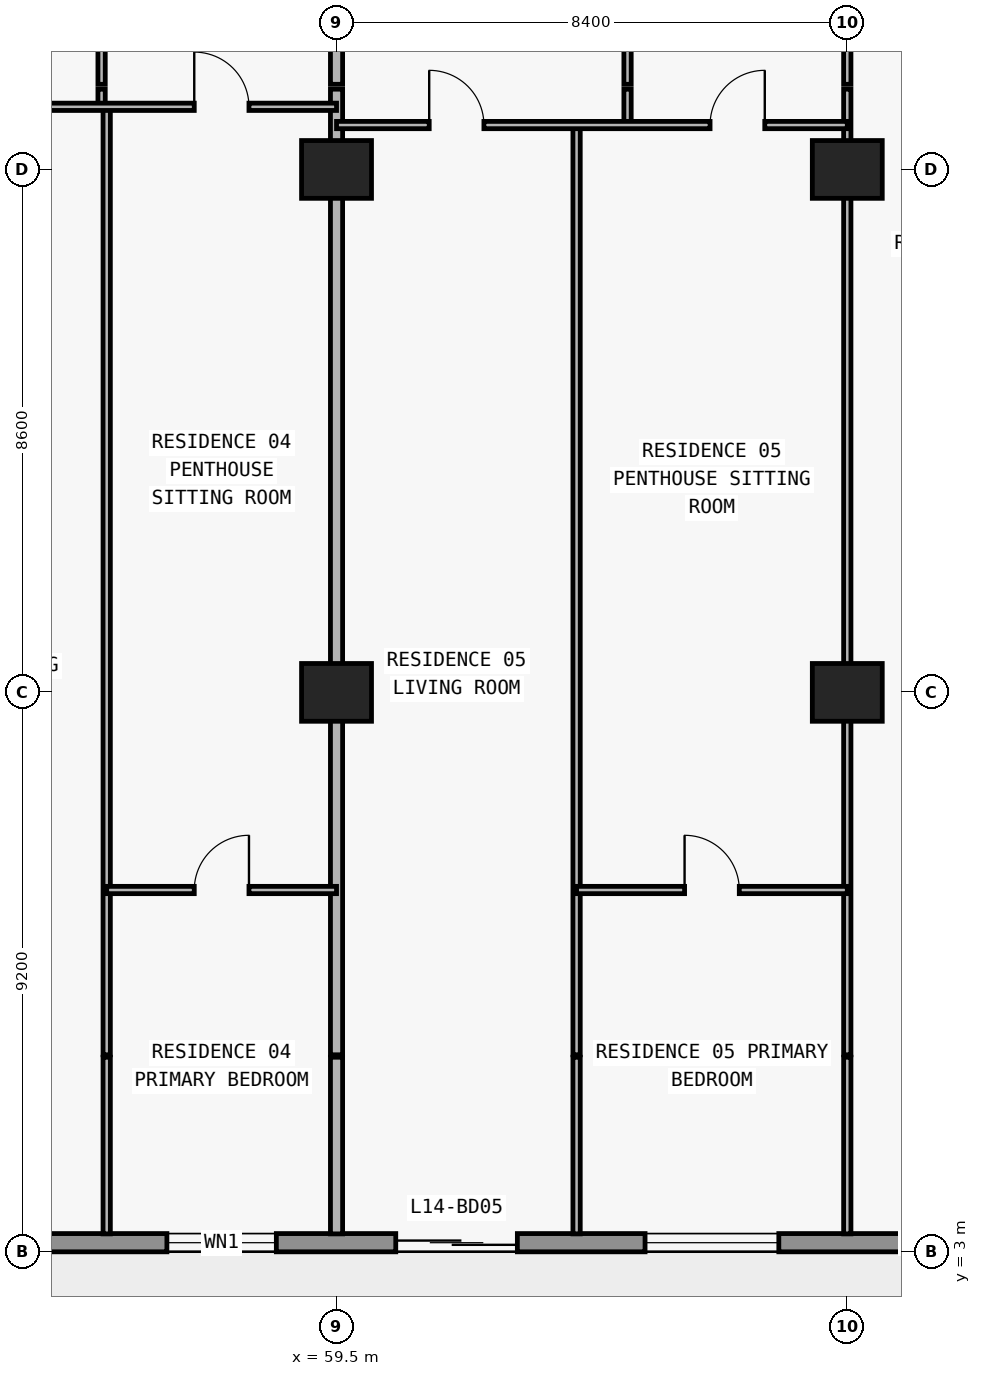
"""IFC4 building model, lengths in metres.
Left out: names, types, materials, properties, quantities, classifications, styles, units other than length and angle.
Written with IfcOpenShell. Run it as: python <this file> out.ifc"""

import sys

from ifc_helpers import new_model, si_unit, direction, frame, frame_2d, origin, origin_2d, place, context, subcontext, project, spatial, rectangle, extrude, element, fill, save


model = new_model("IFC4")
c1 = context("Model", 3, precision=1e-05, world=origin(), true_north=direction((0.0, 1.0)))
c2 = subcontext(c1, "Body", "Model", "MODEL_VIEW")
j1 = project(units=[si_unit("LENGTHUNIT", "METRE"), si_unit("PLANEANGLEUNIT", "RADIAN")], contexts=[c1])
p1 = place(None, origin())
s1 = spatial("IfcSite", under=j1, at=p1, CompositionType="ELEMENT")
p2 = place(p1, origin())
s2 = spatial("IfcBuilding", under=s1, at=p2, CompositionType="ELEMENT")
p3 = place(p2, frame((0.0, 0.0, 56.4)))
s3 = spatial("IfcBuildingStorey", under=s2, at=p3, CompositionType="ELEMENT", Elevation=56.4)
for number, where, z_axis, x_axis in (
    (1, (59.5, 12.2, 0.0), (0.0, 0.0, 1.0), (1.0, 0.0, 0.0)),
    (2, (67.9, 12.2, 0.0), (0.0, 0.0, 1.0), (1.0, 0.0, 0.0)),
    (3, (59.5, 20.8, 0.0), (0.0, 0.0, 1.0), (1.0, 0.0, 0.0)),
    (4, (67.9, 20.8, 0.0), (0.0, 0.0, 1.0), (1.0, 0.0, 0.0)),
):
    element("IfcColumn", number, at=place(p3, frame(where, z_axis=z_axis, x_axis=x_axis)), inside=s3, PredefinedType="COLUMN", context=c2, shape_type="SweptSolid", body=[
        extrude(rectangle(XDim=1.15, YDim=0.95, at=origin_2d()), origin(), (0.0, 0.0, 1.0), 3.05),
    ])
p4 = place(p3, frame((72.7, 3.15, 0.0), z_axis=(0.0, 0.0, 1.0), x_axis=(-1.0, 0.0, 0.0)))
e5 = element("IfcWall", 5, at=p4, inside=s3, PredefinedType="STANDARD", context=c2, shape_type="SweptSolid", body=[
    extrude(rectangle(XDim=67.6, YDim=0.3, at=frame_2d((33.8, 0.0))), origin(), (0.0, 0.0, 1.0), 3.05),
])
p5 = place(p4, frame((59.89, 0.0, 0.0)))
e6 = element("IfcOpeningElement", 6, at=p5, cuts=e5, PredefinedType="OPENING", context=c2, shape_type="SweptSolid", body=[
    extrude(rectangle(XDim=2.0, YDim=2.3, at=frame_2d((1.0, 1.15))), frame((0.0, 0.16, 0.0), z_axis=(0.0, -1.0, 0.0), x_axis=(1.0, 0.0, 0.0)), (0.0, 0.0, 1.0), 0.32),
])
p6 = place(p4, frame((55.21, 0.0, 0.65)))
e7 = element("IfcOpeningElement", 7, at=p6, cuts=e5, PredefinedType="OPENING", context=c2, shape_type="SweptSolid", body=[
    extrude(rectangle(XDim=2.6, YDim=1.85, at=frame_2d((1.3, 0.925))), frame((0.0, 0.16, 0.0), z_axis=(0.0, -1.0, 0.0), x_axis=(1.0, 0.0, 0.0)), (0.0, 0.0, 1.0), 0.32),
])
p7 = place(p4, frame((49.1, 0.0, 0.85)))
e8 = element("IfcOpeningElement", 8, at=p7, cuts=e5, PredefinedType="OPENING", context=c2, shape_type="SweptSolid", body=[
    extrude(rectangle(XDim=2.2, YDim=1.55, at=frame_2d((1.1, 0.775))), frame((0.0, 0.16, 0.0), z_axis=(0.0, -1.0, 0.0), x_axis=(1.0, 0.0, 0.0)), (0.0, 0.0, 1.0), 0.32),
])
p8 = place(p4, frame((43.09, 0.0, 0.0)))
e9 = element("IfcOpeningElement", 9, at=p8, cuts=e5, PredefinedType="OPENING", context=c2, shape_type="SweptSolid", body=[
    extrude(rectangle(XDim=2.0, YDim=2.3, at=frame_2d((1.0, 1.15))), frame((0.0, 0.16, 0.0), z_axis=(0.0, -1.0, 0.0), x_axis=(1.0, 0.0, 0.0)), (0.0, 0.0, 1.0), 0.32),
])
p9 = place(p4, frame((38.41, 0.0, 0.65)))
e10 = element("IfcOpeningElement", 10, at=p9, cuts=e5, PredefinedType="OPENING", context=c2, shape_type="SweptSolid", body=[
    extrude(rectangle(XDim=2.6, YDim=1.85, at=frame_2d((1.3, 0.925))), frame((0.0, 0.16, 0.0), z_axis=(0.0, -1.0, 0.0), x_axis=(1.0, 0.0, 0.0)), (0.0, 0.0, 1.0), 0.32),
])
p10 = place(p4, frame((32.7, 0.0, 0.85)))
e11 = element("IfcOpeningElement", 11, at=p10, cuts=e5, PredefinedType="OPENING", context=c2, shape_type="SweptSolid", body=[
    extrude(rectangle(XDim=2.2, YDim=1.55, at=frame_2d((1.1, 0.775))), frame((0.0, 0.16, 0.0), z_axis=(0.0, -1.0, 0.0), x_axis=(1.0, 0.0, 0.0)), (0.0, 0.0, 1.0), 0.32),
])
p11 = place(p4, frame((27.026, 0.0, 0.0)))
e12 = element("IfcOpeningElement", 12, at=p11, cuts=e5, PredefinedType="OPENING", context=c2, shape_type="SweptSolid", body=[
    extrude(rectangle(XDim=2.0, YDim=2.3, at=frame_2d((1.0, 1.15))), frame((0.0, 0.16, 0.0), z_axis=(0.0, -1.0, 0.0), x_axis=(1.0, 0.0, 0.0)), (0.0, 0.0, 1.0), 0.32),
])
p12 = place(p4, frame((22.726, 0.0, 0.85)))
e13 = element("IfcOpeningElement", 13, at=p12, cuts=e5, PredefinedType="OPENING", context=c2, shape_type="SweptSolid", body=[
    extrude(rectangle(XDim=2.2, YDim=1.55, at=frame_2d((1.1, 0.775))), frame((0.0, 0.16, 0.0), z_axis=(0.0, -1.0, 0.0), x_axis=(1.0, 0.0, 0.0)), (0.0, 0.0, 1.0), 0.32),
])
p13 = place(p4, frame((18.29, 0.0, 0.0)))
e14 = element("IfcOpeningElement", 14, at=p13, cuts=e5, PredefinedType="OPENING", context=c2, shape_type="SweptSolid", body=[
    extrude(rectangle(XDim=2.0, YDim=2.3, at=frame_2d((1.0, 1.15))), frame((0.0, 0.16, 0.0), z_axis=(0.0, -1.0, 0.0), x_axis=(1.0, 0.0, 0.0)), (0.0, 0.0, 1.0), 0.32),
])
p14 = place(p4, frame((14.19, 0.0, 0.85)))
e15 = element("IfcOpeningElement", 15, at=p14, cuts=e5, PredefinedType="OPENING", context=c2, shape_type="SweptSolid", body=[
    extrude(rectangle(XDim=1.8, YDim=1.55, at=frame_2d((0.9, 0.775))), frame((0.0, 0.16, 0.0), z_axis=(0.0, -1.0, 0.0), x_axis=(1.0, 0.0, 0.0)), (0.0, 0.0, 1.0), 0.32),
])
p15 = place(p4, frame((10.226, 0.0, 0.0)))
e16 = element("IfcOpeningElement", 16, at=p15, cuts=e5, PredefinedType="OPENING", context=c2, shape_type="SweptSolid", body=[
    extrude(rectangle(XDim=2.0, YDim=2.3, at=frame_2d((1.0, 1.15))), frame((0.0, 0.16, 0.0), z_axis=(0.0, -1.0, 0.0), x_axis=(1.0, 0.0, 0.0)), (0.0, 0.0, 1.0), 0.32),
])
p16 = place(p4, frame((5.926, 0.0, 0.85)))
e17 = element("IfcOpeningElement", 17, at=p16, cuts=e5, PredefinedType="OPENING", context=c2, shape_type="SweptSolid", body=[
    extrude(rectangle(XDim=2.2, YDim=1.55, at=frame_2d((1.1, 0.775))), frame((0.0, 0.16, 0.0), z_axis=(0.0, -1.0, 0.0), x_axis=(1.0, 0.0, 0.0)), (0.0, 0.0, 1.0), 0.32),
])
p17 = place(p3, frame((55.636, 21.83, 0.0), z_axis=(0.0, 0.0, 1.0), x_axis=(0.0, 1.0, 0.0)))
e18 = element("IfcWall", 18, at=p17, inside=s3, PredefinedType="PARTITIONING", context=c2, shape_type="SweptSolid", body=[
    extrude(rectangle(XDim=0.29, YDim=0.12, at=frame_2d((0.145, 0.0))), origin(), (0.0, 0.0, 1.0), 3.05),
])
p18 = place(p3, frame((55.636, 22.2, 0.0), z_axis=(0.0, 0.0, 1.0), x_axis=(0.0, 1.0, 0.0)))
e19 = element("IfcWall", 19, at=p18, inside=s3, PredefinedType="PARTITIONING", context=c2, shape_type="SweptSolid", body=[
    extrude(rectangle(XDim=4.38, YDim=0.12, at=frame_2d((2.19, 0.0))), origin(), (0.0, 0.0, 1.0), 3.05),
])
p19 = place(p18, frame((1.74, 0.0, 0.0)))
e20 = element("IfcOpeningElement", 20, at=p19, cuts=e19, PredefinedType="OPENING", context=c2, shape_type="SweptSolid", body=[
    extrude(rectangle(XDim=0.9, YDim=2.15, at=frame_2d((0.45, 1.075))), frame((0.0, 0.07, 0.0), z_axis=(0.0, -1.0, 0.0), x_axis=(1.0, 0.0, 0.0)), (0.0, 0.0, 1.0), 0.14),
])
p20 = place(p3, frame((55.72, 3.295, 0.0), z_axis=(0.0, 0.0, 1.0), x_axis=(0.0, 1.0, 0.0)))
e21 = element("IfcWall", 21, at=p20, inside=s3, PredefinedType="PARTITIONING", context=c2, shape_type="SweptSolid", body=[
    extrude(rectangle(XDim=2.905, YDim=0.12, at=frame_2d((1.453, 0.0))), origin(), (0.0, 0.0, 1.0), 3.05),
])
p21 = place(p3, frame((55.72, 6.24, 0.0), z_axis=(0.0, 0.0, 1.0), x_axis=(0.0, 1.0, 0.0)))
e22 = element("IfcWall", 22, at=p21, inside=s3, PredefinedType="PARTITIONING", context=c2, shape_type="SweptSolid", body=[
    extrude(rectangle(XDim=15.585, YDim=0.12, at=frame_2d((7.792, 0.0))), origin(), (0.0, 0.0, 1.0), 3.05),
])
p22 = place(p3, frame((59.5, 3.295, 0.0), z_axis=(0.0, 0.0, 1.0), x_axis=(0.0, 1.0, 0.0)))
e23 = element("IfcWall", 23, at=p22, inside=s3, PredefinedType="PARTITIONING", context=c2, shape_type="SweptSolid", body=[
    extrude(rectangle(XDim=2.905, YDim=0.2, at=frame_2d((1.453, 0.0))), origin(), (0.0, 0.0, 1.0), 3.05),
])
p23 = place(p3, frame((59.5, 6.24, 0.0), z_axis=(0.0, 0.0, 1.0), x_axis=(0.0, 1.0, 0.0)))
e24 = element("IfcWall", 24, at=p23, inside=s3, PredefinedType="PARTITIONING", context=c2, shape_type="SweptSolid", body=[
    extrude(rectangle(XDim=15.88, YDim=0.2, at=frame_2d((7.94, 0.0))), origin(), (0.0, 0.0, 1.0), 2.11),
])
p24 = place(p3, frame((59.5, 22.2, 0.0), z_axis=(0.0, 0.0, 1.0), x_axis=(0.0, 1.0, 0.0)))
e25 = element("IfcWall", 25, at=p24, inside=s3, PredefinedType="PARTITIONING", context=c2, shape_type="SweptSolid", body=[
    extrude(rectangle(XDim=4.38, YDim=0.2, at=frame_2d((2.19, 0.0))), origin(), (0.0, 0.0, 1.0), 2.11),
])
p25 = place(p3, frame((63.448, 3.295, 0.0), z_axis=(0.0, 0.0, 1.0), x_axis=(0.0, 1.0, 0.0)))
e26 = element("IfcWall", 26, at=p25, inside=s3, PredefinedType="PARTITIONING", context=c2, shape_type="SweptSolid", body=[
    extrude(rectangle(XDim=2.905, YDim=0.12, at=frame_2d((1.453, 0.0))), origin(), (0.0, 0.0, 1.0), 3.05),
])
p26 = place(p3, frame((63.448, 6.24, 0.0), z_axis=(0.0, 0.0, 1.0), x_axis=(0.0, 1.0, 0.0)))
e27 = element("IfcWall", 27, at=p26, inside=s3, PredefinedType="PARTITIONING", context=c2, shape_type="SweptSolid", body=[
    extrude(rectangle(XDim=15.29, YDim=0.12, at=frame_2d((7.645, 0.0))), origin(), (0.0, 0.0, 1.0), 3.05),
])
p27 = place(p3, frame((64.286, 21.53, 0.0), z_axis=(0.0, 0.0, 1.0), x_axis=(0.0, 1.0, 0.0)))
e28 = element("IfcWall", 28, at=p27, inside=s3, PredefinedType="PARTITIONING", context=c2, shape_type="SweptSolid", body=[
    extrude(rectangle(XDim=0.59, YDim=0.12, at=frame_2d((0.295, 0.0))), origin(), (0.0, 0.0, 1.0), 3.05),
])
p28 = place(p3, frame((64.286, 22.2, 0.0), z_axis=(0.0, 0.0, 1.0), x_axis=(0.0, 1.0, 0.0)))
e29 = element("IfcWall", 29, at=p28, inside=s3, PredefinedType="PARTITIONING", context=c2, shape_type="SweptSolid", body=[
    extrude(rectangle(XDim=4.38, YDim=0.12, at=frame_2d((2.19, 0.0))), origin(), (0.0, 0.0, 1.0), 3.05),
])
p29 = place(p28, frame((1.74, 0.0, 0.0)))
e30 = element("IfcOpeningElement", 30, at=p29, cuts=e29, PredefinedType="OPENING", context=c2, shape_type="SweptSolid", body=[
    extrude(rectangle(XDim=0.9, YDim=2.15, at=frame_2d((0.45, 1.075))), frame((0.0, 0.07, 0.0), z_axis=(0.0, -1.0, 0.0), x_axis=(1.0, 0.0, 0.0)), (0.0, 0.0, 1.0), 0.14),
])
p30 = place(p3, frame((67.9, 3.295, 0.0), z_axis=(0.0, 0.0, 1.0), x_axis=(0.0, 1.0, 0.0)))
e31 = element("IfcWall", 31, at=p30, inside=s3, PredefinedType="PARTITIONING", context=c2, shape_type="SweptSolid", body=[
    extrude(rectangle(XDim=2.905, YDim=0.12, at=frame_2d((1.453, 0.0))), origin(), (0.0, 0.0, 1.0), 3.05),
])
p31 = place(p3, frame((67.9, 6.24, 0.0), z_axis=(0.0, 0.0, 1.0), x_axis=(0.0, 1.0, 0.0)))
e32 = element("IfcWall", 32, at=p31, inside=s3, PredefinedType="PARTITIONING", context=c2, shape_type="SweptSolid", body=[
    extrude(rectangle(XDim=15.88, YDim=0.12, at=frame_2d((7.94, 0.0))), origin(), (0.0, 0.0, 1.0), 2.11),
])
p32 = place(p3, frame((67.9, 22.2, 0.0), z_axis=(0.0, 0.0, 1.0), x_axis=(0.0, 1.0, 0.0)))
e33 = element("IfcWall", 33, at=p32, inside=s3, PredefinedType="PARTITIONING", context=c2, shape_type="SweptSolid", body=[
    extrude(rectangle(XDim=4.38, YDim=0.12, at=frame_2d((2.19, 0.0))), origin(), (0.0, 0.0, 1.0), 2.11),
])
p33 = place(p32, frame((1.74, 0.0, 0.0)))
e34 = element("IfcOpeningElement", 34, at=p33, cuts=e33, PredefinedType="OPENING", context=c2, shape_type="SweptSolid", body=[
    extrude(rectangle(XDim=0.9, YDim=2.06, at=frame_2d((0.45, 1.03))), frame((0.0, 0.07, 0.0), z_axis=(0.0, -1.0, 0.0), x_axis=(1.0, 0.0, 0.0)), (0.0, 0.0, 1.0), 0.14),
])
p34 = place(p3, frame((55.72, 8.95, 0.0), z_axis=(0.0, 0.0, 1.0), x_axis=(1.0, 0.0, 0.0)))
e35 = element("IfcWall", 35, at=p34, inside=s3, PredefinedType="PARTITIONING", context=c2, shape_type="SweptSolid", body=[
    extrude(rectangle(XDim=3.78, YDim=0.12, at=frame_2d((1.89, 0.0))), origin(), (0.0, 0.0, 1.0), 3.05),
])
p35 = place(p34, frame((1.44, 0.0, 0.0)))
e36 = element("IfcOpeningElement", 36, at=p35, cuts=e35, PredefinedType="OPENING", context=c2, shape_type="SweptSolid", body=[
    extrude(rectangle(XDim=0.9, YDim=2.15, at=frame_2d((0.45, 1.075))), frame((0.0, 0.07, 0.0), z_axis=(0.0, -1.0, 0.0), x_axis=(1.0, 0.0, 0.0)), (0.0, 0.0, 1.0), 0.14),
])
p36 = place(p3, frame((63.448, 8.95, 0.0), z_axis=(0.0, 0.0, 1.0), x_axis=(1.0, 0.0, 0.0)))
e37 = element("IfcWall", 37, at=p36, inside=s3, PredefinedType="PARTITIONING", context=c2, shape_type="SweptSolid", body=[
    extrude(rectangle(XDim=4.452, YDim=0.12, at=frame_2d((2.226, 0.0))), origin(), (0.0, 0.0, 1.0), 3.05),
])
p37 = place(p36, frame((1.776, 0.0, 0.0)))
e38 = element("IfcOpeningElement", 38, at=p37, cuts=e37, PredefinedType="OPENING", context=c2, shape_type="SweptSolid", body=[
    extrude(rectangle(XDim=0.9, YDim=2.15, at=frame_2d((0.45, 1.075))), frame((0.0, 0.07, 0.0), z_axis=(0.0, -1.0, 0.0), x_axis=(1.0, 0.0, 0.0)), (0.0, 0.0, 1.0), 0.14),
])
p38 = place(p3, frame((59.5, 21.53, 0.0), z_axis=(0.0, 0.0, 1.0), x_axis=(1.0, 0.0, 0.0)))
e39 = element("IfcWall", 39, at=p38, inside=s3, PredefinedType="PARTITIONING", context=c2, shape_type="SweptSolid", body=[
    extrude(rectangle(XDim=8.4, YDim=0.12, at=frame_2d((4.2, 0.0))), origin(), (0.0, 0.0, 1.0), 3.05),
])
p39 = place(p38, frame((1.524, 0.0, 0.0)))
e40 = element("IfcOpeningElement", 40, at=p39, cuts=e39, PredefinedType="OPENING", context=c2, shape_type="SweptSolid", body=[
    extrude(rectangle(XDim=0.9, YDim=2.15, at=frame_2d((0.45, 1.075))), frame((0.0, 0.07, 0.0), z_axis=(0.0, -1.0, 0.0), x_axis=(1.0, 0.0, 0.0)), (0.0, 0.0, 1.0), 0.14),
])
p40 = place(p38, frame((6.143, 0.0, 0.0)))
e41 = element("IfcOpeningElement", 41, at=p40, cuts=e39, PredefinedType="OPENING", context=c2, shape_type="SweptSolid", body=[
    extrude(rectangle(XDim=0.9, YDim=2.15, at=frame_2d((0.45, 1.075))), frame((0.0, 0.07, 0.0), z_axis=(0.0, -1.0, 0.0), x_axis=(1.0, 0.0, 0.0)), (0.0, 0.0, 1.0), 0.14),
])
p41 = place(p3, frame((51.37, 21.83, 0.0), z_axis=(0.0, 0.0, 1.0), x_axis=(1.0, 0.0, 0.0)))
e42 = element("IfcWall", 42, at=p41, inside=s3, PredefinedType="PARTITIONING", context=c2, shape_type="SweptSolid", body=[
    extrude(rectangle(XDim=8.13, YDim=0.12, at=frame_2d((4.065, 0.0))), origin(), (0.0, 0.0, 1.0), 3.05),
])
p42 = place(p41, frame((1.683, 0.0, 0.0)))
e43 = element("IfcOpeningElement", 43, at=p42, cuts=e42, PredefinedType="OPENING", context=c2, shape_type="SweptSolid", body=[
    extrude(rectangle(XDim=0.9, YDim=2.15, at=frame_2d((0.45, 1.075))), frame((0.0, 0.07, 0.0), z_axis=(0.0, -1.0, 0.0), x_axis=(1.0, 0.0, 0.0)), (0.0, 0.0, 1.0), 0.14),
])
p43 = place(p41, frame((5.79, 0.0, 0.0)))
e44 = element("IfcOpeningElement", 44, at=p43, cuts=e42, PredefinedType="OPENING", context=c2, shape_type="SweptSolid", body=[
    extrude(rectangle(XDim=0.9, YDim=2.15, at=frame_2d((0.45, 1.075))), frame((0.0, 0.07, 0.0), z_axis=(0.0, -1.0, 0.0), x_axis=(1.0, 0.0, 0.0)), (0.0, 0.0, 1.0), 0.14),
])
p44 = place(p14, origin())
e45 = element("IfcWindow", 45, at=p44, inside=s3, PartitioningType="SINGLE_PANEL", PredefinedType="WINDOW", context=c2, shape_type="SweptSolid", body=[
    extrude(rectangle(XDim=1.8, YDim=1.55, at=frame_2d((0.9, 0.775))), frame((0.0, 0.03, 0.0), z_axis=(0.0, -1.0, 0.0), x_axis=(1.0, 0.0, 0.0)), (0.0, 0.0, 1.0), 0.06),
])
fill(e15, e45)
p45 = place(p15, origin())
e46 = element("IfcDoor", 46, at=p45, inside=s3, OperationType="DOUBLE_DOOR_SLIDING", PredefinedType="DOOR", context=c2, shape_type="SweptSolid", body=[
    extrude(rectangle(XDim=2.0, YDim=2.3, at=frame_2d((1.0, 1.15))), frame((0.0, 0.025, 0.0), z_axis=(0.0, -1.0, 0.0), x_axis=(1.0, 0.0, 0.0)), (0.0, 0.0, 1.0), 0.05),
])
fill(e16, e46)
p46 = place(p16, origin())
e47 = element("IfcWindow", 47, at=p46, inside=s3, PartitioningType="SINGLE_PANEL", PredefinedType="WINDOW", context=c2, shape_type="SweptSolid", body=[
    extrude(rectangle(XDim=2.2, YDim=1.55, at=frame_2d((1.1, 0.775))), frame((0.0, 0.03, 0.0), z_axis=(0.0, -1.0, 0.0), x_axis=(1.0, 0.0, 0.0)), (0.0, 0.0, 1.0), 0.06),
])
fill(e17, e47)
p47 = place(p43, origin())
e48 = element("IfcDoor", 48, at=p47, inside=s3, OperationType="SINGLE_SWING_LEFT", PredefinedType="DOOR", context=c2, shape_type="SweptSolid", body=[
    extrude(rectangle(XDim=0.9, YDim=2.15, at=frame_2d((0.45, 1.075))), frame((0.0, 0.025, 0.0), z_axis=(0.0, -1.0, 0.0), x_axis=(1.0, 0.0, 0.0)), (0.0, 0.0, 1.0), 0.05),
])
fill(e44, e48)
p48 = place(p35, origin())
e49 = element("IfcDoor", 49, at=p48, inside=s3, OperationType="SINGLE_SWING_RIGHT", PredefinedType="DOOR", context=c2, shape_type="SweptSolid", body=[
    extrude(rectangle(XDim=0.9, YDim=2.15, at=frame_2d((0.45, 1.075))), frame((0.0, 0.025, 0.0), z_axis=(0.0, -1.0, 0.0), x_axis=(1.0, 0.0, 0.0)), (0.0, 0.0, 1.0), 0.05),
])
fill(e36, e49)
p49 = place(p39, origin())
e50 = element("IfcDoor", 50, at=p49, inside=s3, OperationType="SINGLE_SWING_LEFT", PredefinedType="DOOR", context=c2, shape_type="SweptSolid", body=[
    extrude(rectangle(XDim=0.9, YDim=2.15, at=frame_2d((0.45, 1.075))), frame((0.0, 0.025, 0.0), z_axis=(0.0, -1.0, 0.0), x_axis=(1.0, 0.0, 0.0)), (0.0, 0.0, 1.0), 0.05),
])
fill(e40, e50)
p50 = place(p40, origin())
e51 = element("IfcDoor", 51, at=p50, inside=s3, OperationType="SINGLE_SWING_RIGHT", PredefinedType="DOOR", context=c2, shape_type="SweptSolid", body=[
    extrude(rectangle(XDim=0.9, YDim=2.15, at=frame_2d((0.45, 1.075))), frame((0.0, 0.025, 0.0), z_axis=(0.0, -1.0, 0.0), x_axis=(1.0, 0.0, 0.0)), (0.0, 0.0, 1.0), 0.05),
])
fill(e41, e51)
p51 = place(p37, origin())
e52 = element("IfcDoor", 52, at=p51, inside=s3, OperationType="SINGLE_SWING_LEFT", PredefinedType="DOOR", context=c2, shape_type="SweptSolid", body=[
    extrude(rectangle(XDim=0.9, YDim=2.15, at=frame_2d((0.45, 1.075))), frame((0.0, 0.025, 0.0), z_axis=(0.0, -1.0, 0.0), x_axis=(1.0, 0.0, 0.0)), (0.0, 0.0, 1.0), 0.05),
])
fill(e38, e52)
save(model, sys.argv[1])
